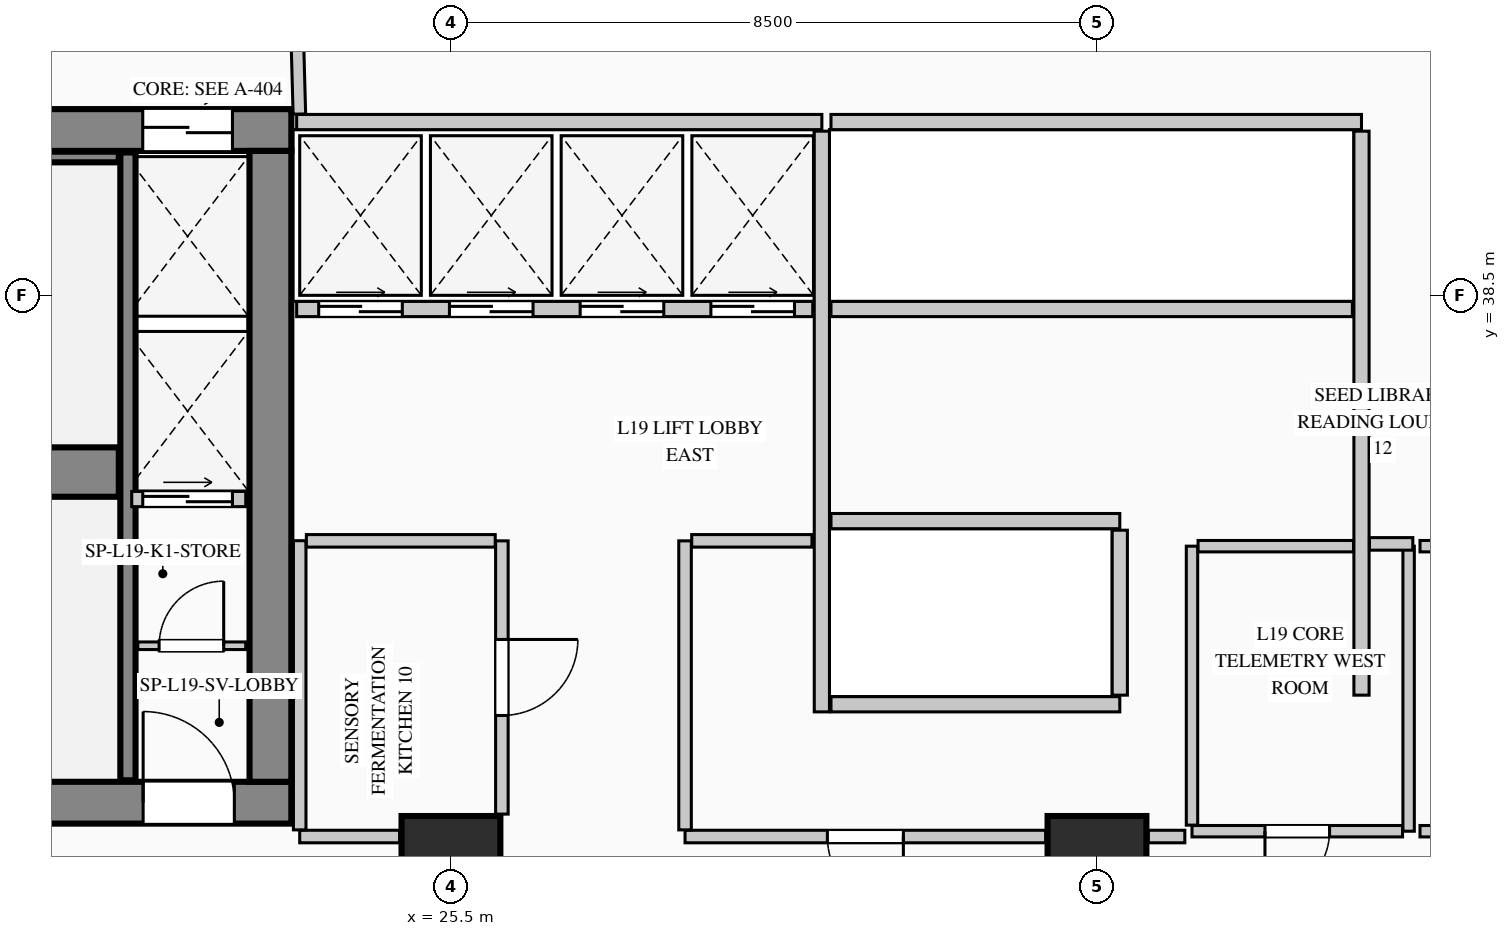
"""IFC4 building model, lengths in metres.
Left out: names, types, materials, properties, quantities, classifications, styles, units other than length and angle.
Written with IfcOpenShell. Run it as: python <this file> out.ifc"""

import sys

from ifc_helpers import new_model, si_unit, direction, frame, frame_2d, origin, origin_2d, place, context, subcontext, project, spatial, rectangle, extrude, element, fill, save


model = new_model("IFC4")
c1 = context("Model", 3, precision=1e-05, world=origin(), true_north=direction((0.0, 1.0)))
c2 = subcontext(c1, "Body", "Model", "MODEL_VIEW")
j1 = project(units=[si_unit("LENGTHUNIT", "METRE"), si_unit("PLANEANGLEUNIT", "RADIAN")], contexts=[c1])
p1 = place(None, origin())
s1 = spatial("IfcSite", under=j1, at=p1, CompositionType="ELEMENT")
p2 = place(p1, origin())
s2 = spatial("IfcBuilding", under=s1, at=p2, CompositionType="ELEMENT")
p3 = place(p2, frame((0.0, 0.0, 84.2)))
s3 = spatial("IfcBuildingStorey", under=s2, at=p3, CompositionType="ELEMENT", Elevation=84.2)
p4 = place(p3, frame((5.45, 40.675, 0.0), z_axis=(0.0, 0.0, 1.0), x_axis=(1.0, 0.0, 0.0)))
e1 = element("IfcWall", 1, at=p4, inside=s3, PredefinedType="SHEAR", context=c2, shape_type="SweptSolid", body=[
    extrude(rectangle(XDim=17.95, YDim=0.55, at=frame_2d((8.975, 0.0))), origin(), (0.0, 0.0, 1.0), 4.4),
])
p5 = place(p4, frame((15.995, 0.0, 0.0)))
e2 = element("IfcOpeningElement", 2, at=p5, cuts=e1, PredefinedType="OPENING", context=c2, shape_type="SweptSolid", body=[
    extrude(rectangle(XDim=1.18, YDim=2.25, at=frame_2d((0.59, 1.125))), frame((0.0, 0.285, 0.0), z_axis=(0.0, -1.0, 0.0), x_axis=(1.0, 0.0, 0.0)), (0.0, 0.0, 1.0), 0.57),
])
p6 = place(p3, frame((5.45, 31.825, 0.0), z_axis=(0.0, 0.0, 1.0), x_axis=(1.0, 0.0, 0.0)))
e3 = element("IfcWall", 3, at=p6, inside=s3, PredefinedType="SHEAR", context=c2, shape_type="SweptSolid", body=[
    extrude(rectangle(XDim=17.95, YDim=0.55, at=frame_2d((8.975, 0.0))), origin(), (0.0, 0.0, 1.0), 4.4),
])
p7 = place(p6, frame((3.2, 0.0, 0.0)))
e4 = element("IfcOpeningElement", 4, at=p7, cuts=e3, PredefinedType="OPENING", context=c2, shape_type="SweptSolid", body=[
    extrude(rectangle(XDim=1.2, YDim=2.2, at=frame_2d((0.6, 1.1))), frame((0.0, 0.285, 0.0), z_axis=(0.0, -1.0, 0.0), x_axis=(1.0, 0.0, 0.0)), (0.0, 0.0, 1.0), 0.57),
])
p8 = place(p6, frame((7.05, 0.0, 0.0)))
e5 = element("IfcOpeningElement", 5, at=p8, cuts=e3, PredefinedType="OPENING", context=c2, shape_type="SweptSolid", body=[
    extrude(rectangle(XDim=1.2, YDim=2.2, at=frame_2d((0.6, 1.1))), frame((0.0, 0.285, 0.0), z_axis=(0.0, -1.0, 0.0), x_axis=(1.0, 0.0, 0.0)), (0.0, 0.0, 1.0), 0.57),
])
p9 = place(p6, frame((8.9, 0.0, 0.0)))
e6 = element("IfcOpeningElement", 6, at=p9, cuts=e3, PredefinedType="OPENING", context=c2, shape_type="SweptSolid", body=[
    extrude(rectangle(XDim=1.15, YDim=2.2, at=frame_2d((0.575, 1.1))), frame((0.0, 0.285, 0.0), z_axis=(0.0, -1.0, 0.0), x_axis=(1.0, 0.0, 0.0)), (0.0, 0.0, 1.0), 0.57),
])
p10 = place(p6, frame((16.0, 0.0, 0.0)))
e7 = element("IfcOpeningElement", 7, at=p10, cuts=e3, PredefinedType="OPENING", context=c2, shape_type="SweptSolid", body=[
    extrude(rectangle(XDim=1.2, YDim=2.2, at=frame_2d((0.6, 1.1))), frame((0.0, 0.285, 0.0), z_axis=(0.0, -1.0, 0.0), x_axis=(1.0, 0.0, 0.0)), (0.0, 0.0, 1.0), 0.57),
])
p11 = place(p3, frame((23.125, 32.1, 0.0), z_axis=(0.0, 0.0, 1.0), x_axis=(0.0, 1.0, 0.0)))
e8 = element("IfcWall", 8, at=p11, inside=s3, PredefinedType="SHEAR", context=c2, shape_type="SweptSolid", body=[
    extrude(rectangle(XDim=8.3, YDim=0.55, at=frame_2d((4.15, 0.0))), origin(), (0.0, 0.0, 1.0), 4.4),
])
p12 = place(p3, frame((14.12, 36.175, 0.0), z_axis=(0.0, 0.0, 1.0), x_axis=(1.0, 0.0, 0.0)))
e9 = element("IfcWall", 9, at=p12, inside=s3, PredefinedType="SHEAR", context=c2, shape_type="SweptSolid", body=[
    extrude(rectangle(XDim=7.01, YDim=0.65, at=frame_2d((3.505, 0.0))), origin(), (0.0, 0.0, 1.0), 4.4),
])
p13 = place(p3, frame((21.25, 32.12, 0.0), z_axis=(0.0, 0.0, 1.0), x_axis=(0.0, 1.0, 0.0)))
e10 = element("IfcWall", 10, at=p13, inside=s3, PredefinedType="SHEAR", context=c2, shape_type="SweptSolid", body=[
    extrude(rectangle(XDim=8.26, YDim=0.2, at=frame_2d((4.13, 0.0))), origin(), (0.0, 0.0, 1.0), 4.4),
])
p14 = place(p3, frame((14.12, 40.32, 0.0), z_axis=(0.0, 0.0, 1.0), x_axis=(1.0, 0.0, 0.0)))
e11 = element("IfcWall", 11, at=p14, inside=s3, PredefinedType="SHEAR", context=c2, shape_type="SweptSolid", body=[
    extrude(rectangle(XDim=7.01, YDim=0.14, at=frame_2d((3.505, 0.0))), origin(), (0.0, 0.0, 1.0), 4.4),
])
for number, where, z_axis, x_axis in (
    (12, (25.5, 31.0, 0.0), (0.0, 0.0, 1.0), (1.0, 0.0, 0.0)),
    (13, (34.0, 31.0, 0.0), (0.0, 0.0, 1.0), (1.0, 0.0, 0.0)),
):
    element("IfcColumn", number, at=place(p3, frame(where, z_axis=z_axis, x_axis=x_axis)), inside=s3, PredefinedType="COLUMN", context=c2, shape_type="SweptSolid", body=[
        extrude(rectangle(XDim=1.3, YDim=1.3, at=origin_2d()), origin(), (0.0, 0.0, 1.0), 4.4),
    ])
p15 = place(p3, frame((21.38, 33.89, 0.0), z_axis=(0.0, 0.0, 1.0), x_axis=(1.0, 0.0, 0.0)))
e14 = element("IfcWall", 14, at=p15, inside=s3, PredefinedType="PARTITIONING", context=c2, shape_type="SweptSolid", body=[
    extrude(rectangle(XDim=1.42, YDim=0.1, at=frame_2d((0.71, 0.0))), origin(), (0.0, 0.0, 1.0), 4.115),
])
p16 = place(p15, frame((0.28, 0.0, 0.0)))
e15 = element("IfcOpeningElement", 15, at=p16, cuts=e14, PredefinedType="OPENING", context=c2, shape_type="SweptSolid", body=[
    extrude(rectangle(XDim=0.85, YDim=2.1, at=frame_2d((0.425, 1.05))), frame((0.0, 0.06, 0.0), z_axis=(0.0, -1.0, 0.0), x_axis=(1.0, 0.0, 0.0)), (0.0, 0.0, 1.0), 0.12),
])
p17 = place(p3, frame((21.3, 35.82, 0.0), z_axis=(0.0, 0.0, 1.0), x_axis=(1.0, 0.0, 0.0)))
e16 = element("IfcWall", 16, at=p17, inside=s3, PredefinedType="PARTITIONING", context=c2, shape_type="SweptSolid", body=[
    extrude(rectangle(XDim=1.5, YDim=0.2, at=frame_2d((0.75, 0.0))), origin(), (0.0, 0.0, 1.0), 4.115),
])
p18 = place(p17, frame((0.145, 0.0, 0.0)))
e17 = element("IfcOpeningElement", 17, at=p18, cuts=e16, PredefinedType="OPENING", context=c2, shape_type="SweptSolid", body=[
    extrude(rectangle(XDim=1.18, YDim=2.25, at=frame_2d((0.59, 1.125))), frame((0.0, 0.11, 0.0), z_axis=(0.0, -1.0, 0.0), x_axis=(1.0, 0.0, 0.0)), (0.0, 0.0, 1.0), 0.22),
])
p19 = place(p3, frame((23.47, 40.78, 0.0), z_axis=(0.0, 0.0, 1.0), x_axis=(1.0, 0.0, 0.0)))
e18 = element("IfcWall", 18, at=p19, inside=s3, PredefinedType="PARTITIONING", context=c2, shape_type="SweptSolid", body=[
    extrude(rectangle(XDim=6.91, YDim=0.2, at=frame_2d((3.455, 0.0))), origin(), (0.0, 0.0, 1.0), 4.115),
])
p20 = place(p3, frame((30.38, 33.02, 0.0), z_axis=(0.0, 0.0, 1.0), x_axis=(0.0, 1.0, 0.0)))
e19 = element("IfcWall", 19, at=p20, inside=s3, PredefinedType="PARTITIONING", context=c2, shape_type="SweptSolid", body=[
    extrude(rectangle(XDim=7.64, YDim=0.2, at=frame_2d((3.82, 0.0))), origin(), (0.0, 0.0, 1.0), 4.115),
])
p21 = place(p3, frame((23.47, 38.32, 0.0), z_axis=(0.0, 0.0, 1.0), x_axis=(1.0, 0.0, 0.0)))
e20 = element("IfcWall", 20, at=p21, inside=s3, PredefinedType="PARTITIONING", context=c2, shape_type="SweptSolid", body=[
    extrude(rectangle(XDim=6.79, YDim=0.2, at=frame_2d((3.395, 0.0))), origin(), (0.0, 0.0, 1.0), 4.115),
])
p22 = place(p21, frame((0.29, 0.0, 0.0)))
e21 = element("IfcOpeningElement", 21, at=p22, cuts=e20, PredefinedType="OPENING", context=c2, shape_type="SweptSolid", body=[
    extrude(rectangle(XDim=1.1, YDim=2.2, at=frame_2d((0.55, 1.1))), frame((0.0, 0.11, 0.0), z_axis=(0.0, -1.0, 0.0), x_axis=(1.0, 0.0, 0.0)), (0.0, 0.0, 1.0), 0.22),
])
p23 = place(p21, frame((2.01, 0.0, 0.0)))
e22 = element("IfcOpeningElement", 22, at=p23, cuts=e20, PredefinedType="OPENING", context=c2, shape_type="SweptSolid", body=[
    extrude(rectangle(XDim=1.1, YDim=2.2, at=frame_2d((0.55, 1.1))), frame((0.0, 0.11, 0.0), z_axis=(0.0, -1.0, 0.0), x_axis=(1.0, 0.0, 0.0)), (0.0, 0.0, 1.0), 0.22),
])
p24 = place(p21, frame((3.73, 0.0, 0.0)))
e23 = element("IfcOpeningElement", 23, at=p24, cuts=e20, PredefinedType="OPENING", context=c2, shape_type="SweptSolid", body=[
    extrude(rectangle(XDim=1.1, YDim=2.2, at=frame_2d((0.55, 1.1))), frame((0.0, 0.11, 0.0), z_axis=(0.0, -1.0, 0.0), x_axis=(1.0, 0.0, 0.0)), (0.0, 0.0, 1.0), 0.22),
])
p25 = place(p21, frame((5.45, 0.0, 0.0)))
e24 = element("IfcOpeningElement", 24, at=p25, cuts=e20, PredefinedType="OPENING", context=c2, shape_type="SweptSolid", body=[
    extrude(rectangle(XDim=1.1, YDim=2.2, at=frame_2d((0.55, 1.1))), frame((0.0, 0.11, 0.0), z_axis=(0.0, -1.0, 0.0), x_axis=(1.0, 0.0, 0.0)), (0.0, 0.0, 1.0), 0.22),
])
p26 = place(p3, frame((30.5, 40.78, 0.0), z_axis=(0.0, 0.0, 1.0), x_axis=(1.0, 0.0, 0.0)))
e25 = element("IfcWall", 25, at=p26, inside=s3, PredefinedType="PARTITIONING", context=c2, shape_type="SweptSolid", body=[
    extrude(rectangle(XDim=6.98, YDim=0.2, at=frame_2d((3.49, 0.0))), origin(), (0.0, 0.0, 1.0), 4.115),
])
p27 = place(p3, frame((37.48, 33.24, 0.0), z_axis=(0.0, 0.0, 1.0), x_axis=(0.0, 1.0, 0.0)))
e26 = element("IfcWall", 26, at=p27, inside=s3, PredefinedType="PARTITIONING", context=c2, shape_type="SweptSolid", body=[
    extrude(rectangle(XDim=7.42, YDim=0.2, at=frame_2d((3.71, 0.0))), origin(), (0.0, 0.0, 1.0), 4.115),
])
p28 = place(p3, frame((30.5, 38.32, 0.0), z_axis=(0.0, 0.0, 1.0), x_axis=(1.0, 0.0, 0.0)))
e27 = element("IfcWall", 27, at=p28, inside=s3, PredefinedType="PARTITIONING", context=c2, shape_type="SweptSolid", body=[
    extrude(rectangle(XDim=6.86, YDim=0.2, at=frame_2d((3.43, 0.0))), origin(), (0.0, 0.0, 1.0), 4.115),
])
for number, where, z_axis, x_axis in (
    (28, (30.5, 35.53, 0.0), (0.0, 0.0, 1.0), (1.0, 0.0, 0.0)),
    (29, (30.5, 33.12, 0.0), (0.0, 0.0, 1.0), (1.0, 0.0, 0.0)),
):
    element("IfcWall", number, at=place(p3, frame(where, z_axis=z_axis, x_axis=x_axis)), inside=s3, PredefinedType="PARTITIONING", context=c2, shape_type="SweptSolid", body=[
        extrude(rectangle(XDim=3.8, YDim=0.2, at=frame_2d((1.9, 0.0))), origin(), (0.0, 0.0, 1.0), 4.115),
    ])
p29 = place(p3, frame((34.3, 33.24, 0.0), z_axis=(0.0, 0.0, 1.0), x_axis=(0.0, 1.0, 0.0)))
e30 = element("IfcWall", 30, at=p29, inside=s3, PredefinedType="PARTITIONING", context=c2, shape_type="SweptSolid", body=[
    extrude(rectangle(XDim=2.17, YDim=0.2, at=frame_2d((1.085, 0.0))), origin(), (0.0, 0.0, 1.0), 4.115),
])
p30 = place(p3, frame((38.1, 35.2, 0.0), z_axis=(0.0, 0.0, 1.0), x_axis=(0.0, -1.0, 0.0)))
e31 = element("IfcWall", 31, at=p30, inside=s3, PredefinedType="PARTITIONING", context=c2, shape_type="SweptSolid", body=[
    extrude(rectangle(XDim=3.75, YDim=0.15, at=frame_2d((1.875, 0.0))), origin(), (0.0, 0.0, 1.0), 4.115),
])
p31 = place(p3, frame((38.02, 31.45, 0.0), z_axis=(0.0, 0.0, 1.0), x_axis=(-1.0, 0.0, 0.0)))
e32 = element("IfcWall", 32, at=p31, inside=s3, PredefinedType="PARTITIONING", context=c2, shape_type="SweptSolid", body=[
    extrude(rectangle(XDim=2.77, YDim=0.15, at=frame_2d((1.385, 0.0))), origin(), (0.0, 0.0, 1.0), 4.115),
])
p32 = place(p31, frame((0.96, 0.0, 0.0)))
e33 = element("IfcOpeningElement", 33, at=p32, cuts=e32, PredefinedType="OPENING", context=c2, shape_type="SweptSolid", body=[
    extrude(rectangle(XDim=0.85, YDim=2.1, at=frame_2d((0.425, 1.05))), frame((0.0, 0.085, 0.0), z_axis=(0.0, -1.0, 0.0), x_axis=(1.0, 0.0, 0.0)), (0.0, 0.0, 1.0), 0.17),
])
p33 = place(p3, frame((35.25, 31.53, 0.0), z_axis=(0.0, 0.0, 1.0), x_axis=(0.0, 1.0, 0.0)))
e34 = element("IfcWall", 34, at=p33, inside=s3, PredefinedType="PARTITIONING", context=c2, shape_type="SweptSolid", body=[
    extrude(rectangle(XDim=3.67, YDim=0.15, at=frame_2d((1.835, 0.0))), origin(), (0.0, 0.0, 1.0), 4.115),
])
p34 = place(p3, frame((35.33, 35.2, 0.0), z_axis=(0.0, 0.0, 1.0), x_axis=(1.0, 0.0, 0.0)))
e35 = element("IfcWall", 35, at=p34, inside=s3, PredefinedType="PARTITIONING", context=c2, shape_type="SweptSolid", body=[
    extrude(rectangle(XDim=2.045, YDim=0.15, at=frame_2d((1.022, 0.0))), origin(), (0.0, 0.0, 1.0), 4.115),
])
p35 = place(p3, frame((41.07, 31.45, 0.0), z_axis=(0.0, 0.0, 1.0), x_axis=(-1.0, 0.0, 0.0)))
e36 = element("IfcWall", 36, at=p35, inside=s3, PredefinedType="PARTITIONING", context=c2, shape_type="SweptSolid", body=[
    extrude(rectangle(XDim=2.82, YDim=0.15, at=frame_2d((1.41, 0.0))), origin(), (0.0, 0.0, 1.0), 4.115),
])
p36 = place(p35, frame((0.985, 0.0, 0.0)))
e37 = element("IfcOpeningElement", 37, at=p36, cuts=e36, PredefinedType="OPENING", context=c2, shape_type="SweptSolid", body=[
    extrude(rectangle(XDim=0.85, YDim=2.1, at=frame_2d((0.425, 1.05))), frame((0.0, 0.085, 0.0), z_axis=(0.0, -1.0, 0.0), x_axis=(1.0, 0.0, 0.0)), (0.0, 0.0, 1.0), 0.17),
])
p37 = place(p3, frame((38.25, 35.2, 0.0), z_axis=(0.0, 0.0, 1.0), x_axis=(1.0, 0.0, 0.0)))
e38 = element("IfcWall", 38, at=p37, inside=s3, PredefinedType="PARTITIONING", context=c2, shape_type="SweptSolid", body=[
    extrude(rectangle(XDim=2.82, YDim=0.15, at=frame_2d((1.41, 0.0))), origin(), (0.0, 0.0, 1.0), 4.115),
])
p38 = place(p3, frame((26.17, 35.27, 0.0), z_axis=(0.0, 0.0, 1.0), x_axis=(0.0, -1.0, 0.0)))
e39 = element("IfcWall", 39, at=p38, inside=s3, PredefinedType="PARTITIONING", context=c2, shape_type="SweptSolid", body=[
    extrude(rectangle(XDim=3.595, YDim=0.165, at=frame_2d((1.797, 0.0))), origin(), (0.0, 0.0, 1.0), 4.115),
])
p39 = place(p38, frame((1.298, 0.0, 0.0)))
e40 = element("IfcOpeningElement", 40, at=p39, cuts=e39, PredefinedType="OPENING", context=c2, shape_type="SweptSolid", body=[
    extrude(rectangle(XDim=1.0, YDim=2.15, at=frame_2d((0.5, 1.075))), frame((0.0, 0.093, 0.0), z_axis=(0.0, -1.0, 0.0), x_axis=(1.0, 0.0, 0.0)), (0.0, 0.0, 1.0), 0.185),
])
p40 = place(p3, frame((24.825, 31.38, 0.0), z_axis=(0.0, 0.0, 1.0), x_axis=(-1.0, 0.0, 0.0)))
e41 = element("IfcWall", 41, at=p40, inside=s3, PredefinedType="PARTITIONING", context=c2, shape_type="SweptSolid", body=[
    extrude(rectangle(XDim=1.315, YDim=0.165, at=frame_2d((0.657, 0.0))), origin(), (0.0, 0.0, 1.0), 4.115),
])
p41 = place(p3, frame((23.51, 31.468, 0.0), z_axis=(0.0, 0.0, 1.0), x_axis=(0.0, 1.0, 0.0)))
e42 = element("IfcWall", 42, at=p41, inside=s3, PredefinedType="PARTITIONING", context=c2, shape_type="SweptSolid", body=[
    extrude(rectangle(XDim=3.804, YDim=0.165, at=frame_2d((1.902, 0.0))), origin(), (0.0, 0.0, 1.0), 4.115),
])
p42 = place(p3, frame((23.597, 35.27, 0.0), z_axis=(0.0, 0.0, 1.0), x_axis=(1.0, 0.0, 0.0)))
e43 = element("IfcWall", 43, at=p42, inside=s3, PredefinedType="PARTITIONING", context=c2, shape_type="SweptSolid", body=[
    extrude(rectangle(XDim=2.485, YDim=0.165, at=frame_2d((1.243, 0.0))), origin(), (0.0, 0.0, 1.0), 4.115),
])
p43 = place(p3, frame((38.156, 35.23, 0.0), z_axis=(0.0, 0.0, 1.0), x_axis=(-1.0, 0.0, 0.0)))
e44 = element("IfcWall", 44, at=p43, inside=s3, PredefinedType="PARTITIONING", context=c2, shape_type="SweptSolid", body=[
    extrude(rectangle(XDim=0.571, YDim=0.165, at=frame_2d((0.285, 0.0))), origin(), (0.0, 0.0, 1.0), 4.115),
])
p44 = place(p3, frame((35.156, 31.38, 0.0), z_axis=(0.0, 0.0, 1.0), x_axis=(-1.0, 0.0, 0.0)))
e45 = element("IfcWall", 45, at=p44, inside=s3, PredefinedType="PARTITIONING", context=c2, shape_type="SweptSolid", body=[
    extrude(rectangle(XDim=0.48, YDim=0.165, at=frame_2d((0.24, 0.0))), origin(), (0.0, 0.0, 1.0), 4.115),
])
p45 = place(p3, frame((33.325, 31.38, 0.0), z_axis=(0.0, 0.0, 1.0), x_axis=(-1.0, 0.0, 0.0)))
e46 = element("IfcWall", 46, at=p45, inside=s3, PredefinedType="PARTITIONING", context=c2, shape_type="SweptSolid", body=[
    extrude(rectangle(XDim=4.745, YDim=0.165, at=frame_2d((2.373, 0.0))), origin(), (0.0, 0.0, 1.0), 4.115),
])
p46 = place(p45, frame((1.873, 0.0, 0.0)))
e47 = element("IfcOpeningElement", 47, at=p46, cuts=e46, PredefinedType="OPENING", context=c2, shape_type="SweptSolid", body=[
    extrude(rectangle(XDim=1.0, YDim=2.15, at=frame_2d((0.5, 1.075))), frame((0.0, 0.093, 0.0), z_axis=(0.0, -1.0, 0.0), x_axis=(1.0, 0.0, 0.0)), (0.0, 0.0, 1.0), 0.185),
])
p47 = place(p3, frame((28.58, 31.468, 0.0), z_axis=(0.0, 0.0, 1.0), x_axis=(0.0, 1.0, 0.0)))
e48 = element("IfcWall", 48, at=p47, inside=s3, PredefinedType="PARTITIONING", context=c2, shape_type="SweptSolid", body=[
    extrude(rectangle(XDim=3.802, YDim=0.165, at=frame_2d((1.901, 0.0))), origin(), (0.0, 0.0, 1.0), 4.115),
])
p48 = place(p3, frame((28.667, 35.27, 0.0), z_axis=(0.0, 0.0, 1.0), x_axis=(1.0, 0.0, 0.0)))
e49 = element("IfcWall", 49, at=p48, inside=s3, PredefinedType="PARTITIONING", context=c2, shape_type="SweptSolid", body=[
    extrude(rectangle(XDim=1.583, YDim=0.165, at=frame_2d((0.791, 0.0))), origin(), (0.0, 0.0, 1.0), 4.115),
])
p49 = place(p3, frame((23.506, 40.885, 0.0), z_axis=(0.0, 0.0, 1.0), x_axis=(-0.027441464163, 0.999623412113, 0.0)))
e50 = element("IfcWall", 50, at=p49, inside=s3, PredefinedType="PARTITIONING", context=c2, shape_type="SweptSolid", body=[
    extrude(rectangle(XDim=2.331, YDim=0.165, at=frame_2d((1.166, 0.0))), origin(), (0.0, 0.0, 1.0), 4.115),
])
p50 = place(p10, origin())
e51 = element("IfcDoor", 51, at=p50, inside=s3, OperationType="SINGLE_SWING_LEFT", PredefinedType="DOOR", context=c2, shape_type="SweptSolid", body=[
    extrude(rectangle(XDim=1.2, YDim=2.2, at=frame_2d((0.6, 1.1))), frame((0.0, 0.025, 0.0), z_axis=(0.0, -1.0, 0.0), x_axis=(1.0, 0.0, 0.0)), (0.0, 0.0, 1.0), 0.05),
])
fill(e7, e51)
p51 = place(p16, origin())
e52 = element("IfcDoor", 52, at=p51, inside=s3, OperationType="SINGLE_SWING_RIGHT", PredefinedType="DOOR", context=c2, shape_type="SweptSolid", body=[
    extrude(rectangle(XDim=0.85, YDim=2.1, at=frame_2d((0.425, 1.05))), frame((0.0, 0.025, 0.0), z_axis=(0.0, -1.0, 0.0), x_axis=(1.0, 0.0, 0.0)), (0.0, 0.0, 1.0), 0.05),
])
fill(e15, e52)
p52 = place(p5, origin())
e53 = element("IfcDoor", 53, at=p52, inside=s3, OperationType="DOUBLE_DOOR_SLIDING", PredefinedType="DOOR", context=c2, shape_type="SweptSolid", body=[
    extrude(rectangle(XDim=1.18, YDim=2.25, at=frame_2d((0.59, 1.125))), frame((0.0, 0.025, 0.0), z_axis=(0.0, -1.0, 0.0), x_axis=(1.0, 0.0, 0.0)), (0.0, 0.0, 1.0), 0.05),
])
fill(e2, e53)
p53 = place(p18, origin())
e54 = element("IfcDoor", 54, at=p53, inside=s3, OperationType="DOUBLE_DOOR_SLIDING", PredefinedType="DOOR", context=c2, shape_type="SweptSolid", body=[
    extrude(rectangle(XDim=1.18, YDim=2.25, at=frame_2d((0.59, 1.125))), frame((0.0, 0.025, 0.0), z_axis=(0.0, -1.0, 0.0), x_axis=(1.0, 0.0, 0.0)), (0.0, 0.0, 1.0), 0.05),
])
fill(e17, e54)
p54 = place(p22, origin())
e55 = element("IfcDoor", 55, at=p54, inside=s3, OperationType="DOUBLE_DOOR_SLIDING", PredefinedType="DOOR", context=c2, shape_type="SweptSolid", body=[
    extrude(rectangle(XDim=1.1, YDim=2.2, at=frame_2d((0.55, 1.1))), frame((0.0, 0.025, 0.0), z_axis=(0.0, -1.0, 0.0), x_axis=(1.0, 0.0, 0.0)), (0.0, 0.0, 1.0), 0.05),
])
fill(e21, e55)
p55 = place(p23, origin())
e56 = element("IfcDoor", 56, at=p55, inside=s3, OperationType="DOUBLE_DOOR_SLIDING", PredefinedType="DOOR", context=c2, shape_type="SweptSolid", body=[
    extrude(rectangle(XDim=1.1, YDim=2.2, at=frame_2d((0.55, 1.1))), frame((0.0, 0.025, 0.0), z_axis=(0.0, -1.0, 0.0), x_axis=(1.0, 0.0, 0.0)), (0.0, 0.0, 1.0), 0.05),
])
fill(e22, e56)
p56 = place(p24, origin())
e57 = element("IfcDoor", 57, at=p56, inside=s3, OperationType="DOUBLE_DOOR_SLIDING", PredefinedType="DOOR", context=c2, shape_type="SweptSolid", body=[
    extrude(rectangle(XDim=1.1, YDim=2.2, at=frame_2d((0.55, 1.1))), frame((0.0, 0.025, 0.0), z_axis=(0.0, -1.0, 0.0), x_axis=(1.0, 0.0, 0.0)), (0.0, 0.0, 1.0), 0.05),
])
fill(e23, e57)
p57 = place(p25, origin())
e58 = element("IfcDoor", 58, at=p57, inside=s3, OperationType="DOUBLE_DOOR_SLIDING", PredefinedType="DOOR", context=c2, shape_type="SweptSolid", body=[
    extrude(rectangle(XDim=1.1, YDim=2.2, at=frame_2d((0.55, 1.1))), frame((0.0, 0.025, 0.0), z_axis=(0.0, -1.0, 0.0), x_axis=(1.0, 0.0, 0.0)), (0.0, 0.0, 1.0), 0.05),
])
fill(e24, e58)
p58 = place(p32, origin())
e59 = element("IfcDoor", 59, at=p58, inside=s3, OperationType="SINGLE_SWING_RIGHT", PredefinedType="DOOR", context=c2, shape_type="SweptSolid", body=[
    extrude(rectangle(XDim=0.85, YDim=2.1, at=frame_2d((0.425, 1.05))), frame((0.0, 0.025, 0.0), z_axis=(0.0, -1.0, 0.0), x_axis=(1.0, 0.0, 0.0)), (0.0, 0.0, 1.0), 0.05),
])
fill(e33, e59)
p59 = place(p39, origin())
e60 = element("IfcDoor", 60, at=p59, inside=s3, OperationType="SINGLE_SWING_LEFT", PredefinedType="DOOR", context=c2, shape_type="SweptSolid", body=[
    extrude(rectangle(XDim=1.0, YDim=2.15, at=frame_2d((0.5, 1.075))), frame((0.0, 0.025, 0.0), z_axis=(0.0, -1.0, 0.0), x_axis=(1.0, 0.0, 0.0)), (0.0, 0.0, 1.0), 0.05),
])
fill(e40, e60)
p60 = place(p46, origin())
e61 = element("IfcDoor", 61, at=p60, inside=s3, OperationType="SINGLE_SWING_LEFT", PredefinedType="DOOR", context=c2, shape_type="SweptSolid", body=[
    extrude(rectangle(XDim=1.0, YDim=2.15, at=frame_2d((0.5, 1.075))), frame((0.0, 0.025, 0.0), z_axis=(0.0, -1.0, 0.0), x_axis=(1.0, 0.0, 0.0)), (0.0, 0.0, 1.0), 0.05),
])
fill(e47, e61)
save(model, sys.argv[1])
